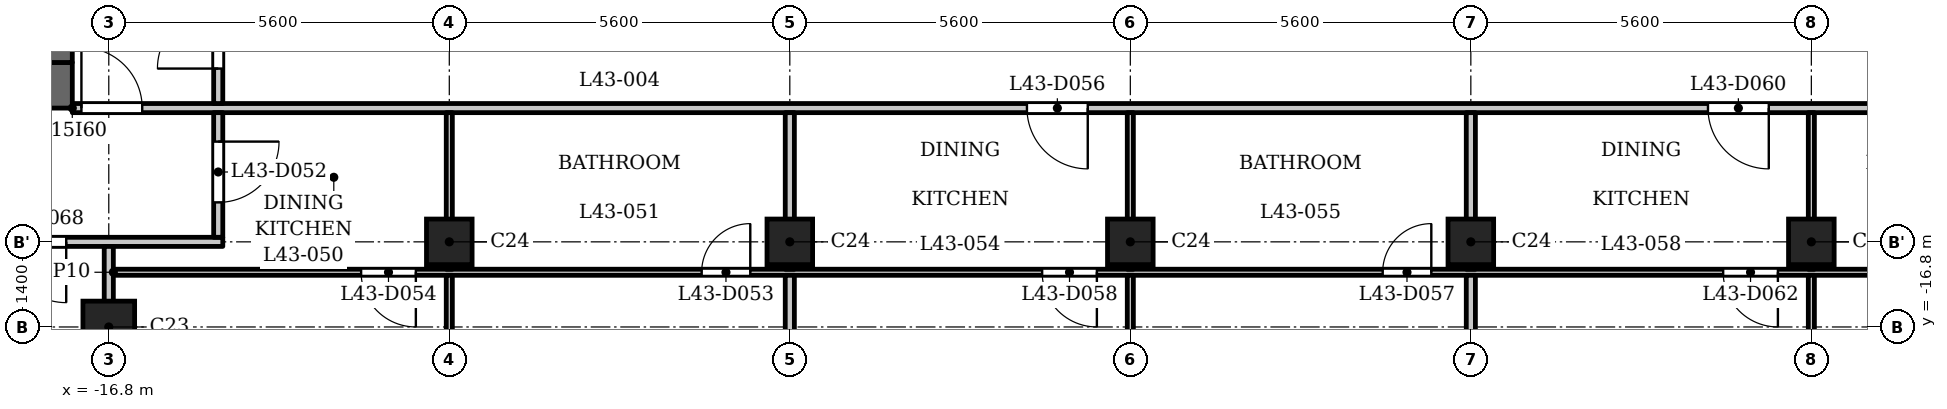
"""IFC4 building model, lengths in metres.
Left out: names, types, materials, properties, quantities, classifications, styles, units other than length and angle.
Written with IfcOpenShell. Run it as: python <this file> out.ifc"""

import sys

from ifc_helpers import new_model, si_unit, direction, frame, frame_2d, origin, origin_2d, place, context, subcontext, project, spatial, rectangle, extrude, element, fill, save


model = new_model("IFC4")
c1 = context("Model", 3, precision=1e-05, world=origin(), true_north=direction((0.0, 1.0)))
c2 = subcontext(c1, "Body", "Model", "MODEL_VIEW")
j1 = project(units=[si_unit("LENGTHUNIT", "METRE"), si_unit("PLANEANGLEUNIT", "RADIAN")], contexts=[c1])
p1 = place(None, origin())
s1 = spatial("IfcSite", under=j1, at=p1, CompositionType="ELEMENT")
p2 = place(p1, origin())
s2 = spatial("IfcBuilding", under=s1, at=p2, CompositionType="ELEMENT")
p3 = place(p2, frame((0.0, 0.0, 167.6)))
s3 = spatial("IfcBuildingStorey", under=s2, at=p3, CompositionType="ELEMENT", Elevation=167.6)
p4 = place(p3, frame((-16.8, -16.8, 0.0), z_axis=(0.0, 0.0, 1.0), x_axis=(1.0, 0.0, 0.0)))
e1 = element("IfcColumn", 1, at=p4, inside=s3, PredefinedType="COLUMN", context=c2, shape_type="SweptSolid", body=[
    extrude(rectangle(XDim=0.85, YDim=0.85, at=origin_2d()), origin(), (0.0, 0.0, 1.0), 3.5),
])
for number, where, z_axis, x_axis in (
    (2, (-11.2, -15.4, 0.0), (0.0, 0.0, 1.0), (1.0, 0.0, 0.0)),
    (3, (-5.6, -15.4, 0.0), (0.0, 0.0, 1.0), (1.0, 0.0, 0.0)),
    (4, (0.0, -15.4, 0.0), (0.0, 0.0, 1.0), (1.0, 0.0, 0.0)),
    (5, (5.6, -15.4, 0.0), (0.0, 0.0, 1.0), (1.0, 0.0, 0.0)),
    (6, (11.2, -15.4, 0.0), (0.0, 0.0, 1.0), (1.0, 0.0, 0.0)),
):
    element("IfcColumn", number, at=place(p3, frame(where, z_axis=z_axis, x_axis=x_axis)), inside=s3, PredefinedType="COLUMN", context=c2, shape_type="SweptSolid", body=[
        extrude(rectangle(XDim=0.75, YDim=0.75, at=origin_2d()), origin(), (0.0, 0.0, 1.0), 3.5),
    ])
p5 = place(p3, frame((-17.4, -12.825, 0.0), z_axis=(0.0, 0.0, 1.0), x_axis=(-1.0, 0.0, 0.0)))
e7 = element("IfcWall", 7, at=p5, inside=s3, PredefinedType="SHEAR", context=c2, shape_type="SweptSolid", body=[
    extrude(rectangle(XDim=10.4, YDim=0.75, at=frame_2d((5.2, 0.0))), origin(), (0.0, 0.0, 1.0), 3.2),
])
p6 = place(p3, frame((-17.6, -12.45, 0.0), z_axis=(0.0, 0.0, 1.0), x_axis=(0.0, 1.0, 0.0)))
e8 = element("IfcWall", 8, at=p6, inside=s3, PredefinedType="SHEAR", context=c2, shape_type="SweptSolid", body=[
    extrude(rectangle(XDim=24.9, YDim=0.4, at=frame_2d((12.45, 0.0))), origin(), (0.0, 0.0, 1.0), 3.2),
])
p7 = place(p6, frame((8.65, 0.0, 0.0)))
e9 = element("IfcOpeningElement", 9, at=p7, cuts=e8, PredefinedType="OPENING", context=c2, shape_type="SweptSolid", body=[
    extrude(rectangle(XDim=0.9, YDim=2.1, at=frame_2d((0.45, 1.05))), frame((0.0, 0.21, 0.0), z_axis=(0.0, -1.0, 0.0), x_axis=(1.0, 0.0, 0.0)), (0.0, 0.0, 1.0), 0.42),
])
p8 = place(p6, frame((15.6, 0.0, 0.0)))
e10 = element("IfcOpeningElement", 10, at=p8, cuts=e8, PredefinedType="OPENING", context=c2, shape_type="SweptSolid", body=[
    extrude(rectangle(XDim=1.1, YDim=2.1, at=frame_2d((0.55, 1.05))), frame((0.0, 0.21, 0.0), z_axis=(0.0, -1.0, 0.0), x_axis=(1.0, 0.0, 0.0)), (0.0, 0.0, 1.0), 0.42),
])
p9 = place(p6, frame((18.0, 0.0, 0.0)))
e11 = element("IfcOpeningElement", 11, at=p9, cuts=e8, PredefinedType="OPENING", context=c2, shape_type="SweptSolid", body=[
    extrude(rectangle(XDim=1.1, YDim=2.1, at=frame_2d((0.55, 1.05))), frame((0.0, 0.21, 0.0), z_axis=(0.0, -1.0, 0.0), x_axis=(1.0, 0.0, 0.0)), (0.0, 0.0, 1.0), 0.42),
])
p10 = place(p6, frame((23.025, 0.0, 0.0)))
e12 = element("IfcOpeningElement", 12, at=p10, cuts=e8, PredefinedType="OPENING", context=c2, shape_type="SweptSolid", body=[
    extrude(rectangle(XDim=1.1, YDim=2.1, at=frame_2d((0.55, 1.05))), frame((0.0, 0.21, 0.0), z_axis=(0.0, -1.0, 0.0), x_axis=(1.0, 0.0, 0.0)), (0.0, 0.0, 1.0), 0.42),
])
p11 = place(p6, frame((0.775, 0.0, 0.0)))
e13 = element("IfcOpeningElement", 13, at=p11, cuts=e8, PredefinedType="OPENING", context=c2, shape_type="SweptSolid", body=[
    extrude(rectangle(XDim=1.1, YDim=2.1, at=frame_2d((0.55, 1.05))), frame((0.0, 0.21, 0.0), z_axis=(0.0, -1.0, 0.0), x_axis=(1.0, 0.0, 0.0)), (0.0, 0.0, 1.0), 0.42),
])
p12 = place(p6, frame((12.925, 0.0, 0.0)))
e14 = element("IfcOpeningElement", 14, at=p12, cuts=e8, PredefinedType="OPENING", context=c2, shape_type="SweptSolid", body=[
    extrude(rectangle(XDim=1.8, YDim=2.1, at=frame_2d((0.9, 1.05))), frame((0.0, 0.21, 0.0), z_axis=(0.0, -1.0, 0.0), x_axis=(1.0, 0.0, 0.0)), (0.0, 0.0, 1.0), 0.42),
])
p13 = place(p3, frame((-16.725, -15.9, 0.0), z_axis=(0.0, 0.0, 1.0), x_axis=(1.0, 0.0, 0.0)))
e15 = element("IfcWall", 15, at=p13, inside=s3, PredefinedType="PARTITIONING", context=c2, shape_type="SweptSolid", body=[
    extrude(rectangle(XDim=33.45, YDim=0.1, at=frame_2d((16.725, 0.0))), origin(), (0.0, 0.0, 1.0), 3.2),
])
p14 = place(p13, frame((9.675, 0.0, 0.0)))
e16 = element("IfcOpeningElement", 16, at=p14, cuts=e15, PredefinedType="OPENING", context=c2, shape_type="SweptSolid", body=[
    extrude(rectangle(XDim=0.8, YDim=2.1, at=frame_2d((0.4, 1.05))), frame((0.0, 0.06, 0.0), z_axis=(0.0, -1.0, 0.0), x_axis=(1.0, 0.0, 0.0)), (0.0, 0.0, 1.0), 0.12),
])
p15 = place(p13, frame((4.075, 0.0, 0.0)))
e17 = element("IfcOpeningElement", 17, at=p15, cuts=e15, PredefinedType="OPENING", context=c2, shape_type="SweptSolid", body=[
    extrude(rectangle(XDim=0.9, YDim=2.1, at=frame_2d((0.45, 1.05))), frame((0.0, 0.06, 0.0), z_axis=(0.0, -1.0, 0.0), x_axis=(1.0, 0.0, 0.0)), (0.0, 0.0, 1.0), 0.12),
])
p16 = place(p13, frame((20.875, 0.0, 0.0)))
e18 = element("IfcOpeningElement", 18, at=p16, cuts=e15, PredefinedType="OPENING", context=c2, shape_type="SweptSolid", body=[
    extrude(rectangle(XDim=0.8, YDim=2.1, at=frame_2d((0.4, 1.05))), frame((0.0, 0.06, 0.0), z_axis=(0.0, -1.0, 0.0), x_axis=(1.0, 0.0, 0.0)), (0.0, 0.0, 1.0), 0.12),
])
p17 = place(p13, frame((15.275, 0.0, 0.0)))
e19 = element("IfcOpeningElement", 19, at=p17, cuts=e15, PredefinedType="OPENING", context=c2, shape_type="SweptSolid", body=[
    extrude(rectangle(XDim=0.9, YDim=2.1, at=frame_2d((0.45, 1.05))), frame((0.0, 0.06, 0.0), z_axis=(0.0, -1.0, 0.0), x_axis=(1.0, 0.0, 0.0)), (0.0, 0.0, 1.0), 0.12),
])
p18 = place(p13, frame((30.825, 0.0, 0.0)))
e20 = element("IfcOpeningElement", 20, at=p18, cuts=e15, PredefinedType="OPENING", context=c2, shape_type="SweptSolid", body=[
    extrude(rectangle(XDim=0.8, YDim=2.1, at=frame_2d((0.4, 1.05))), frame((0.0, 0.06, 0.0), z_axis=(0.0, -1.0, 0.0), x_axis=(1.0, 0.0, 0.0)), (0.0, 0.0, 1.0), 0.12),
])
p19 = place(p13, frame((26.475, 0.0, 0.0)))
e21 = element("IfcOpeningElement", 21, at=p19, cuts=e15, PredefinedType="OPENING", context=c2, shape_type="SweptSolid", body=[
    extrude(rectangle(XDim=0.9, YDim=2.1, at=frame_2d((0.45, 1.05))), frame((0.0, 0.06, 0.0), z_axis=(0.0, -1.0, 0.0), x_axis=(1.0, 0.0, 0.0)), (0.0, 0.0, 1.0), 0.12),
])
p20 = place(p3, frame((-27.484, -15.4, 0.0), z_axis=(0.0, 0.0, 1.0), x_axis=(1.0, 0.0, 0.0)))
e22 = element("IfcWall", 22, at=p20, inside=s3, PredefinedType="PARTITIONING", context=c2, shape_type="SweptSolid", body=[
    extrude(rectangle(XDim=12.559, YDim=0.15, at=frame_2d((6.279, 0.0))), origin(), (0.0, 0.0, 1.0), 3.2),
])
p21 = place(p20, frame((8.984, 0.0, 0.0)))
e23 = element("IfcOpeningElement", 23, at=p21, cuts=e22, PredefinedType="OPENING", context=c2, shape_type="SweptSolid", body=[
    extrude(rectangle(XDim=1.0, YDim=2.1, at=frame_2d((0.5, 1.05))), frame((0.0, 0.085, 0.0), z_axis=(0.0, -1.0, 0.0), x_axis=(1.0, 0.0, 0.0)), (0.0, 0.0, 1.0), 0.17),
])
p22 = place(p3, frame((-17.4, -13.2, 0.0), z_axis=(0.0, 0.0, 1.0), x_axis=(1.0, 0.0, 0.0)))
e24 = element("IfcWall", 24, at=p22, inside=s3, PredefinedType="PARTITIONING", context=c2, shape_type="SweptSolid", body=[
    extrude(rectangle(XDim=34.8, YDim=0.15, at=frame_2d((17.4, 0.0))), origin(), (0.0, 0.0, 1.0), 3.2),
])
p23 = place(p22, frame((0.15, 0.0, 0.0)))
e25 = element("IfcOpeningElement", 25, at=p23, cuts=e24, PredefinedType="OPENING", context=c2, shape_type="SweptSolid", body=[
    extrude(rectangle(XDim=1.0, YDim=2.1, at=frame_2d((0.5, 1.05))), frame((0.0, 0.085, 0.0), z_axis=(0.0, -1.0, 0.0), x_axis=(1.0, 0.0, 0.0)), (0.0, 0.0, 1.0), 0.17),
])
p24 = place(p22, frame((33.55, 0.0, 0.0)))
e26 = element("IfcOpeningElement", 26, at=p24, cuts=e24, PredefinedType="OPENING", context=c2, shape_type="SweptSolid", body=[
    extrude(rectangle(XDim=1.0, YDim=2.1, at=frame_2d((0.5, 1.05))), frame((0.0, 0.085, 0.0), z_axis=(0.0, -1.0, 0.0), x_axis=(1.0, 0.0, 0.0)), (0.0, 0.0, 1.0), 0.17),
])
p25 = place(p22, frame((15.7, 0.0, 0.0)))
e27 = element("IfcOpeningElement", 27, at=p25, cuts=e24, PredefinedType="OPENING", context=c2, shape_type="SweptSolid", body=[
    extrude(rectangle(XDim=1.0, YDim=2.1, at=frame_2d((0.5, 1.05))), frame((0.0, 0.085, 0.0), z_axis=(0.0, -1.0, 0.0), x_axis=(1.0, 0.0, 0.0)), (0.0, 0.0, 1.0), 0.17),
])
p26 = place(p22, frame((26.9, 0.0, 0.0)))
e28 = element("IfcOpeningElement", 28, at=p26, cuts=e24, PredefinedType="OPENING", context=c2, shape_type="SweptSolid", body=[
    extrude(rectangle(XDim=1.0, YDim=2.1, at=frame_2d((0.5, 1.05))), frame((0.0, 0.085, 0.0), z_axis=(0.0, -1.0, 0.0), x_axis=(1.0, 0.0, 0.0)), (0.0, 0.0, 1.0), 0.17),
])
p27 = place(p3, frame((-16.8, -22.88, 0.0), z_axis=(0.0, 0.0, 1.0), x_axis=(0.0, 1.0, 0.0)))
e29 = element("IfcWall", 29, at=p27, inside=s3, PredefinedType="PARTITIONING", context=c2, shape_type="SweptSolid", body=[
    extrude(rectangle(XDim=7.405, YDim=0.15, at=frame_2d((3.702, 0.0))), origin(), (0.0, 0.0, 1.0), 3.2),
])
p28 = place(p3, frame((-15.0, -15.325, 0.0), z_axis=(0.0, 0.0, 1.0), x_axis=(0.0, 1.0, 0.0)))
e30 = element("IfcWall", 30, at=p28, inside=s3, PredefinedType="PARTITIONING", context=c2, shape_type="SweptSolid", body=[
    extrude(rectangle(XDim=2.05, YDim=0.15, at=frame_2d((1.025, 0.0))), origin(), (0.0, 0.0, 1.0), 3.2),
])
p29 = place(p28, frame((0.574, 0.0, 0.0)))
e31 = element("IfcOpeningElement", 31, at=p29, cuts=e30, PredefinedType="OPENING", context=c2, shape_type="SweptSolid", body=[
    extrude(rectangle(XDim=1.0, YDim=2.1, at=frame_2d((0.5, 1.05))), frame((0.0, 0.085, 0.0), z_axis=(0.0, -1.0, 0.0), x_axis=(1.0, 0.0, 0.0)), (0.0, 0.0, 1.0), 0.17),
])
p30 = place(p3, frame((-15.0, -13.125, 0.0), z_axis=(0.0, 0.0, 1.0), x_axis=(0.0, 1.0, 0.0)))
e32 = element("IfcWall", 32, at=p30, inside=s3, PredefinedType="PARTITIONING", context=c2, shape_type="SweptSolid", body=[
    extrude(rectangle(XDim=6.356, YDim=0.15, at=frame_2d((3.178, 0.0))), origin(), (0.0, 0.0, 1.0), 3.2),
])
p31 = place(p30, frame((0.575, 0.0, 0.0)))
e33 = element("IfcOpeningElement", 33, at=p31, cuts=e32, PredefinedType="OPENING", context=c2, shape_type="SweptSolid", body=[
    extrude(rectangle(XDim=1.0, YDim=2.1, at=frame_2d((0.5, 1.05))), frame((0.0, 0.085, 0.0), z_axis=(0.0, -1.0, 0.0), x_axis=(1.0, 0.0, 0.0)), (0.0, 0.0, 1.0), 0.17),
])
p32 = place(p3, frame((-11.2, -22.88, 0.0), z_axis=(0.0, 0.0, 1.0), x_axis=(0.0, 1.0, 0.0)))
e34 = element("IfcWall", 34, at=p32, inside=s3, PredefinedType="PARTITIONING", context=c2, shape_type="SweptSolid", body=[
    extrude(rectangle(XDim=6.93, YDim=0.1, at=frame_2d((3.465, 0.0))), origin(), (0.0, 0.0, 1.0), 3.2),
])
p33 = place(p32, frame((1.22, 0.0, 0.0)))
e35 = element("IfcOpeningElement", 35, at=p33, cuts=e34, PredefinedType="OPENING", context=c2, shape_type="SweptSolid", body=[
    extrude(rectangle(XDim=0.9, YDim=2.1, at=frame_2d((0.45, 1.05))), frame((0.0, 0.06, 0.0), z_axis=(0.0, -1.0, 0.0), x_axis=(1.0, 0.0, 0.0)), (0.0, 0.0, 1.0), 0.12),
])
p34 = place(p3, frame((-11.2, -15.85, 0.0), z_axis=(0.0, 0.0, 1.0), x_axis=(0.0, 1.0, 0.0)))
e36 = element("IfcWall", 36, at=p34, inside=s3, PredefinedType="PARTITIONING", context=c2, shape_type="SweptSolid", body=[
    extrude(rectangle(XDim=2.575, YDim=0.1, at=frame_2d((1.288, 0.0))), origin(), (0.0, 0.0, 1.0), 3.2),
])
p35 = place(p3, frame((-5.6, -22.88, 0.0), z_axis=(0.0, 0.0, 1.0), x_axis=(0.0, 1.0, 0.0)))
e37 = element("IfcWall", 37, at=p35, inside=s3, PredefinedType="PARTITIONING", context=c2, shape_type="SweptSolid", body=[
    extrude(rectangle(XDim=6.93, YDim=0.15, at=frame_2d((3.465, 0.0))), origin(), (0.0, 0.0, 1.0), 3.2),
])
p36 = place(p3, frame((-5.6, -15.85, 0.0), z_axis=(0.0, 0.0, 1.0), x_axis=(0.0, 1.0, 0.0)))
e38 = element("IfcWall", 38, at=p36, inside=s3, PredefinedType="PARTITIONING", context=c2, shape_type="SweptSolid", body=[
    extrude(rectangle(XDim=2.575, YDim=0.15, at=frame_2d((1.288, 0.0))), origin(), (0.0, 0.0, 1.0), 3.2),
])
p37 = place(p3, frame((0.0, -22.88, 0.0), z_axis=(0.0, 0.0, 1.0), x_axis=(0.0, 1.0, 0.0)))
e39 = element("IfcWall", 39, at=p37, inside=s3, PredefinedType="PARTITIONING", context=c2, shape_type="SweptSolid", body=[
    extrude(rectangle(XDim=6.93, YDim=0.1, at=frame_2d((3.465, 0.0))), origin(), (0.0, 0.0, 1.0), 3.2),
])
p38 = place(p37, frame((1.22, 0.0, 0.0)))
e40 = element("IfcOpeningElement", 40, at=p38, cuts=e39, PredefinedType="OPENING", context=c2, shape_type="SweptSolid", body=[
    extrude(rectangle(XDim=0.9, YDim=2.1, at=frame_2d((0.45, 1.05))), frame((0.0, 0.06, 0.0), z_axis=(0.0, -1.0, 0.0), x_axis=(1.0, 0.0, 0.0)), (0.0, 0.0, 1.0), 0.12),
])
p39 = place(p3, frame((0.0, -15.85, 0.0), z_axis=(0.0, 0.0, 1.0), x_axis=(0.0, 1.0, 0.0)))
e41 = element("IfcWall", 41, at=p39, inside=s3, PredefinedType="PARTITIONING", context=c2, shape_type="SweptSolid", body=[
    extrude(rectangle(XDim=2.575, YDim=0.1, at=frame_2d((1.288, 0.0))), origin(), (0.0, 0.0, 1.0), 3.2),
])
p40 = place(p3, frame((5.6, -22.88, 0.0), z_axis=(0.0, 0.0, 1.0), x_axis=(0.0, 1.0, 0.0)))
e42 = element("IfcWall", 42, at=p40, inside=s3, PredefinedType="PARTITIONING", context=c2, shape_type="SweptSolid", body=[
    extrude(rectangle(XDim=6.93, YDim=0.15, at=frame_2d((3.465, 0.0))), origin(), (0.0, 0.0, 1.0), 3.2),
])
p41 = place(p3, frame((5.6, -15.85, 0.0), z_axis=(0.0, 0.0, 1.0), x_axis=(0.0, 1.0, 0.0)))
e43 = element("IfcWall", 43, at=p41, inside=s3, PredefinedType="PARTITIONING", context=c2, shape_type="SweptSolid", body=[
    extrude(rectangle(XDim=2.575, YDim=0.15, at=frame_2d((1.288, 0.0))), origin(), (0.0, 0.0, 1.0), 3.2),
])
p42 = place(p3, frame((11.2, -22.88, 0.0), z_axis=(0.0, 0.0, 1.0), x_axis=(0.0, 1.0, 0.0)))
e44 = element("IfcWall", 44, at=p42, inside=s3, PredefinedType="PARTITIONING", context=c2, shape_type="SweptSolid", body=[
    extrude(rectangle(XDim=6.93, YDim=0.1, at=frame_2d((3.465, 0.0))), origin(), (0.0, 0.0, 1.0), 3.2),
])
p43 = place(p42, frame((1.22, 0.0, 0.0)))
e45 = element("IfcOpeningElement", 45, at=p43, cuts=e44, PredefinedType="OPENING", context=c2, shape_type="SweptSolid", body=[
    extrude(rectangle(XDim=0.9, YDim=2.1, at=frame_2d((0.45, 1.05))), frame((0.0, 0.06, 0.0), z_axis=(0.0, -1.0, 0.0), x_axis=(1.0, 0.0, 0.0)), (0.0, 0.0, 1.0), 0.12),
])
p44 = place(p3, frame((11.2, -15.85, 0.0), z_axis=(0.0, 0.0, 1.0), x_axis=(0.0, 1.0, 0.0)))
e46 = element("IfcWall", 46, at=p44, inside=s3, PredefinedType="PARTITIONING", context=c2, shape_type="SweptSolid", body=[
    extrude(rectangle(XDim=2.575, YDim=0.1, at=frame_2d((1.288, 0.0))), origin(), (0.0, 0.0, 1.0), 3.2),
])
p45 = place(p31, origin())
e47 = element("IfcDoor", 47, at=p45, inside=s3, OperationType="SINGLE_SWING_RIGHT", PredefinedType="DOOR", context=c2, shape_type="SweptSolid", body=[
    extrude(rectangle(XDim=1.0, YDim=2.1, at=frame_2d((0.5, 1.05))), frame((0.0, 0.025, 0.0), z_axis=(0.0, -1.0, 0.0), x_axis=(1.0, 0.0, 0.0)), (0.0, 0.0, 1.0), 0.05),
])
fill(e33, e47)
p46 = place(p23, origin())
e48 = element("IfcDoor", 48, at=p46, inside=s3, OperationType="SINGLE_SWING_RIGHT", PredefinedType="DOOR", context=c2, shape_type="SweptSolid", body=[
    extrude(rectangle(XDim=1.0, YDim=2.1, at=frame_2d((0.5, 1.05))), frame((0.0, 0.025, 0.0), z_axis=(0.0, -1.0, 0.0), x_axis=(1.0, 0.0, 0.0)), (0.0, 0.0, 1.0), 0.05),
])
fill(e25, e48)
p47 = place(p29, origin())
e49 = element("IfcDoor", 49, at=p47, inside=s3, OperationType="SINGLE_SWING_RIGHT", PredefinedType="DOOR", context=c2, shape_type="SweptSolid", body=[
    extrude(rectangle(XDim=1.0, YDim=2.1, at=frame_2d((0.5, 1.05))), frame((0.0, 0.025, 0.0), z_axis=(0.0, -1.0, 0.0), x_axis=(1.0, 0.0, 0.0)), (0.0, 0.0, 1.0), 0.05),
])
fill(e31, e49)
p48 = place(p14, origin())
e50 = element("IfcDoor", 50, at=p48, inside=s3, OperationType="SINGLE_SWING_LEFT", PredefinedType="DOOR", context=c2, shape_type="SweptSolid", body=[
    extrude(rectangle(XDim=0.8, YDim=2.1, at=frame_2d((0.4, 1.05))), frame((0.0, 0.025, 0.0), z_axis=(0.0, -1.0, 0.0), x_axis=(1.0, 0.0, 0.0)), (0.0, 0.0, 1.0), 0.05),
])
fill(e16, e50)
p49 = place(p15, origin())
e51 = element("IfcDoor", 51, at=p49, inside=s3, OperationType="SINGLE_SWING_RIGHT", PredefinedType="DOOR", context=c2, shape_type="SweptSolid", body=[
    extrude(rectangle(XDim=0.9, YDim=2.1, at=frame_2d((0.45, 1.05))), frame((0.0, 0.025, 0.0), z_axis=(0.0, -1.0, 0.0), x_axis=(1.0, 0.0, 0.0)), (0.0, 0.0, 1.0), 0.05),
])
fill(e17, e51)
p50 = place(p25, origin())
e52 = element("IfcDoor", 52, at=p50, inside=s3, OperationType="SINGLE_SWING_RIGHT", PredefinedType="DOOR", context=c2, shape_type="SweptSolid", body=[
    extrude(rectangle(XDim=1.0, YDim=2.1, at=frame_2d((0.5, 1.05))), frame((0.0, 0.025, 0.0), z_axis=(0.0, -1.0, 0.0), x_axis=(1.0, 0.0, 0.0)), (0.0, 0.0, 1.0), 0.05),
])
fill(e27, e52)
p51 = place(p16, origin())
e53 = element("IfcDoor", 53, at=p51, inside=s3, OperationType="SINGLE_SWING_LEFT", PredefinedType="DOOR", context=c2, shape_type="SweptSolid", body=[
    extrude(rectangle(XDim=0.8, YDim=2.1, at=frame_2d((0.4, 1.05))), frame((0.0, 0.025, 0.0), z_axis=(0.0, -1.0, 0.0), x_axis=(1.0, 0.0, 0.0)), (0.0, 0.0, 1.0), 0.05),
])
fill(e18, e53)
p52 = place(p17, origin())
e54 = element("IfcDoor", 54, at=p52, inside=s3, OperationType="SINGLE_SWING_RIGHT", PredefinedType="DOOR", context=c2, shape_type="SweptSolid", body=[
    extrude(rectangle(XDim=0.9, YDim=2.1, at=frame_2d((0.45, 1.05))), frame((0.0, 0.025, 0.0), z_axis=(0.0, -1.0, 0.0), x_axis=(1.0, 0.0, 0.0)), (0.0, 0.0, 1.0), 0.05),
])
fill(e19, e54)
p53 = place(p26, origin())
e55 = element("IfcDoor", 55, at=p53, inside=s3, OperationType="SINGLE_SWING_RIGHT", PredefinedType="DOOR", context=c2, shape_type="SweptSolid", body=[
    extrude(rectangle(XDim=1.0, YDim=2.1, at=frame_2d((0.5, 1.05))), frame((0.0, 0.025, 0.0), z_axis=(0.0, -1.0, 0.0), x_axis=(1.0, 0.0, 0.0)), (0.0, 0.0, 1.0), 0.05),
])
fill(e28, e55)
p54 = place(p19, origin())
e56 = element("IfcDoor", 56, at=p54, inside=s3, OperationType="SINGLE_SWING_RIGHT", PredefinedType="DOOR", context=c2, shape_type="SweptSolid", body=[
    extrude(rectangle(XDim=0.9, YDim=2.1, at=frame_2d((0.45, 1.05))), frame((0.0, 0.025, 0.0), z_axis=(0.0, -1.0, 0.0), x_axis=(1.0, 0.0, 0.0)), (0.0, 0.0, 1.0), 0.05),
])
fill(e21, e56)
p55 = place(p21, origin())
e57 = element("IfcDoor", 57, at=p55, inside=s3, OperationType="SINGLE_SWING_RIGHT", PredefinedType="DOOR", context=c2, shape_type="SweptSolid", body=[
    extrude(rectangle(XDim=1.0, YDim=2.1, at=frame_2d((0.5, 1.05))), frame((0.0, 0.025, 0.0), z_axis=(0.0, -1.0, 0.0), x_axis=(1.0, 0.0, 0.0)), (0.0, 0.0, 1.0), 0.05),
])
fill(e23, e57)
save(model, sys.argv[1])
